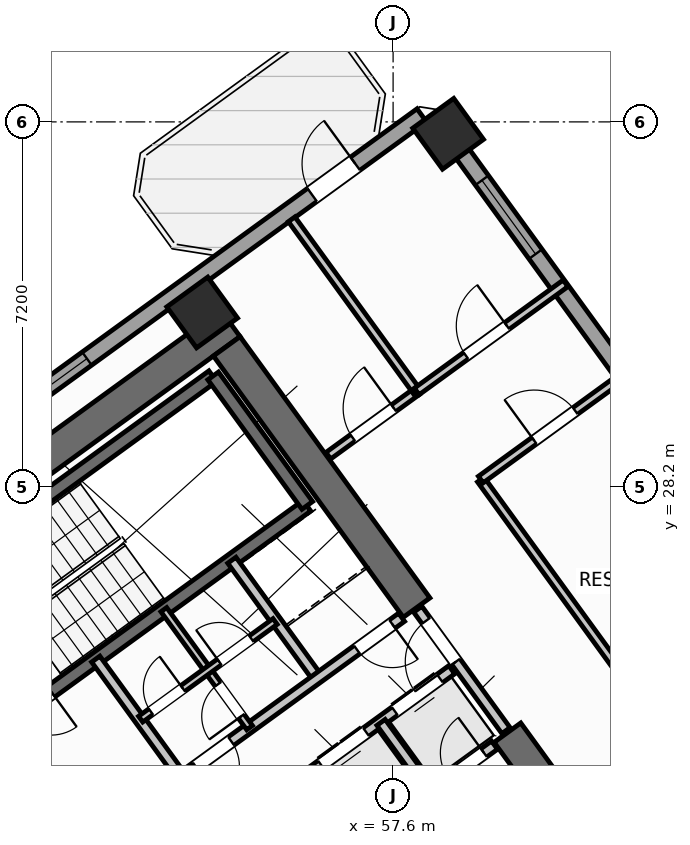
"""IFC4 building model, lengths in metres.
Left out: names, types, materials, properties, quantities, classifications, styles, units other than length and angle.
Written with IfcOpenShell. Run it as: python <this file> out.ifc"""

import sys

from ifc_helpers import new_model, si_unit, direction, frame, frame_2d, origin, origin_2d, place, context, subcontext, project, spatial, rectangle, hollow_rectangle, extrude, source, transform, mapped, element, fill, save


model = new_model("IFC4")
c1 = context("Model", 3, precision=1e-05, world=origin(), true_north=direction((0.0, 1.0)))
c2 = subcontext(c1, "Body", "Model", "MODEL_VIEW")
j1 = project(units=[si_unit("LENGTHUNIT", "METRE"), si_unit("PLANEANGLEUNIT", "RADIAN")], contexts=[c1])
p1 = place(None, origin())
s1 = spatial("IfcSite", under=j1, at=p1, CompositionType="ELEMENT")
p2 = place(p1, origin())
s2 = spatial("IfcBuilding", under=s1, at=p2, CompositionType="ELEMENT")
p3 = place(p2, frame((0.0, 0.0, 38.4)))
s3 = spatial("IfcBuildingStorey", under=s2, at=p3, CompositionType="ELEMENT", Elevation=38.4)
p4 = place(p3, frame((44.325, 24.113, 0.0), z_axis=(0.0, 0.0, 1.0), x_axis=(0.809012664862, 0.58779121131, 0.0)))
e1 = element("IfcWall", 1, at=p4, inside=s3, PredefinedType="SHEAR", context=c2, shape_type="SweptSolid", body=[
    extrude(rectangle(XDim=12.44, YDim=0.65, at=frame_2d((6.22, 0.0))), origin(), (0.0, 0.0, 1.0), 3.35),
])
p5 = place(p3, frame((61.929, 20.494, 0.0), z_axis=(0.0, 0.0, 1.0), x_axis=(-0.58782982593, 0.808984607855, 0.0)))
e2 = element("IfcWall", 2, at=p5, inside=s3, PredefinedType="SHEAR", context=c2, shape_type="SweptSolid", body=[
    extrude(rectangle(XDim=3.525, YDim=0.65, at=frame_2d((1.762, 0.0))), origin(), (0.0, 0.0, 1.0), 3.35),
])
p6 = place(p3, frame((58.064, 25.813, 0.0), z_axis=(0.0, 0.0, 1.0), x_axis=(-0.58777996584, 0.809020835181, 0.0)))
e3 = element("IfcWall", 3, at=p6, inside=s3, PredefinedType="SHEAR", context=c2, shape_type="SweptSolid", body=[
    extrude(rectangle(XDim=6.375, YDim=0.65, at=frame_2d((3.188, 0.0))), origin(), (0.0, 0.0, 1.0), 3.35),
])
m1 = source(origin(), c2, "Body", "SweptSolid", [
    extrude(hollow_rectangle(XDim=1.0, YDim=1.0, WallThickness=0.04, at=origin_2d()), origin(), (0.0, 0.0, 1.0), 3.6),
])
for number, where, z_axis, x_axis in (
    (4, (53.832, 31.638, 0.0), (0.0, 0.0, 1.0), (0.809, 0.588, 0.0)),
    (5, (58.686, 35.165, 0.0), (0.0, 0.0, 1.0), (0.809, 0.588, 0.0)),
):
    element("IfcColumn", number, at=place(p3, frame(where, z_axis=z_axis, x_axis=x_axis)), inside=s3, PredefinedType="COLUMN", context=c2, shape_type="MappedRepresentation", body=[
        mapped(m1, transform((0.0, 0.0, 0.0), scale=1.0)),
    ])
p7 = place(p3, frame((43.938, 25.192, 0.0), z_axis=(0.0, 0.0, 1.0), x_axis=(0.809016324578, 0.587786174187, 0.0)))
e6 = element("IfcWall", 6, at=p7, inside=s3, PredefinedType="STANDARD", context=c2, shape_type="SweptSolid", body=[
    extrude(rectangle(XDim=17.587, YDim=0.32, at=frame_2d((8.794, 0.0))), origin(), (0.0, 0.0, 1.0), 3.35),
])
p8 = place(p7, frame((14.914, 0.0, 0.0)))
e7 = element("IfcOpeningElement", 7, at=p8, cuts=e6, PredefinedType="OPENING", context=c2, shape_type="SweptSolid", body=[
    extrude(rectangle(XDim=1.05, YDim=2.15, at=frame_2d((0.525, 1.075))), frame((0.0, 0.17, 0.0), z_axis=(0.0, -1.0, 0.0), x_axis=(1.0, 0.0, 0.0)), (0.0, 0.0, 1.0), 0.34),
])
p9 = place(p7, frame((2.169, 0.0, 0.8)))
e8 = element("IfcOpeningElement", 8, at=p9, cuts=e6, PredefinedType="OPENING", context=c2, shape_type="SweptSolid", body=[
    extrude(rectangle(XDim=2.1, YDim=1.55, at=frame_2d((1.05, 0.775))), frame((0.0, 0.17, 0.0), z_axis=(0.0, -1.0, 0.0), x_axis=(1.0, 0.0, 0.0)), (0.0, 0.0, 1.0), 0.34),
])
p10 = place(p7, frame((7.319, 0.0, 0.8)))
e9 = element("IfcOpeningElement", 9, at=p10, cuts=e6, PredefinedType="OPENING", context=c2, shape_type="SweptSolid", body=[
    extrude(rectangle(XDim=2.1, YDim=1.55, at=frame_2d((1.05, 0.775))), frame((0.0, 0.17, 0.0), z_axis=(0.0, -1.0, 0.0), x_axis=(1.0, 0.0, 0.0)), (0.0, 0.0, 1.0), 0.34),
])
p11 = place(p3, frame((58.455, 35.484, 0.0), z_axis=(0.0, 0.0, 1.0), x_axis=(0.587783625747, -0.809018176127, 0.0)))
e10 = element("IfcWall", 10, at=p11, inside=s3, PredefinedType="STANDARD", context=c2, shape_type="SweptSolid", body=[
    extrude(rectangle(XDim=21.587, YDim=0.32, at=frame_2d((10.794, 0.0))), origin(), (0.0, 0.0, 1.0), 2.725),
])
p12 = place(p11, frame((1.529, 0.0, 0.85)))
e11 = element("IfcOpeningElement", 11, at=p12, cuts=e10, PredefinedType="OPENING", context=c2, shape_type="SweptSolid", body=[
    extrude(rectangle(XDim=1.8, YDim=1.5, at=frame_2d((0.9, 0.75))), frame((0.0, 0.17, 0.0), z_axis=(0.0, -1.0, 0.0), x_axis=(1.0, 0.0, 0.0)), (0.0, 0.0, 1.0), 0.34),
])
p13 = place(p11, frame((10.444, 0.0, 0.85)))
e12 = element("IfcOpeningElement", 12, at=p13, cuts=e10, PredefinedType="OPENING", context=c2, shape_type="SweptSolid", body=[
    extrude(rectangle(XDim=1.8, YDim=1.5, at=frame_2d((0.9, 0.75))), frame((0.0, 0.17, 0.0), z_axis=(0.0, -1.0, 0.0), x_axis=(1.0, 0.0, 0.0)), (0.0, 0.0, 1.0), 0.34),
])
p14 = place(p11, frame((17.595, 0.0, 0.85)))
e13 = element("IfcOpeningElement", 13, at=p14, cuts=e10, PredefinedType="OPENING", context=c2, shape_type="SweptSolid", body=[
    extrude(rectangle(XDim=1.5, YDim=1.5, at=frame_2d((0.75, 0.75))), frame((0.0, 0.17, 0.0), z_axis=(0.0, -1.0, 0.0), x_axis=(1.0, 0.0, 0.0)), (0.0, 0.0, 1.0), 0.34),
])
p15 = place(p3, frame((48.006, 25.996, 0.0), z_axis=(0.0, 0.0, 1.0), x_axis=(0.80901903764, 0.587782439969, 0.0)))
e14 = element("IfcWall", 14, at=p15, inside=s3, PredefinedType="SHEAR", context=c2, shape_type="SweptSolid", body=[
    extrude(rectangle(XDim=7.46, YDim=0.26, at=frame_2d((3.73, 0.0))), origin(), (0.0, 0.0, 1.0), 3.35),
])
p16 = place(p3, frame((49.863, 23.44, 0.0), z_axis=(0.0, 0.0, 1.0), x_axis=(0.809003474932, 0.587803859759, 0.0)))
e15 = element("IfcWall", 15, at=p16, inside=s3, PredefinedType="SHEAR", context=c2, shape_type="SweptSolid", body=[
    extrude(rectangle(XDim=7.46, YDim=0.26, at=frame_2d((3.73, 0.0))), origin(), (0.0, 0.0, 1.0), 3.35),
])
p17 = place(p16, frame((0.36, 0.0, 0.0)))
e16 = element("IfcOpeningElement", 16, at=p17, cuts=e15, PredefinedType="OPENING", context=c2, shape_type="SweptSolid", body=[
    extrude(rectangle(XDim=0.86, YDim=2.05, at=frame_2d((0.43, 1.025))), frame((0.0, 0.14, 0.0), z_axis=(0.0, -1.0, 0.0), x_axis=(1.0, 0.0, 0.0)), (0.0, 0.0, 1.0), 0.28),
])
p18 = place(p3, frame((55.906, 27.831, 0.0), z_axis=(0.0, 0.0, 1.0), x_axis=(-0.587804123638, 0.809003283204, 0.0)))
e17 = element("IfcWall", 17, at=p18, inside=s3, PredefinedType="SHEAR", context=c2, shape_type="SweptSolid", body=[
    extrude(rectangle(XDim=3.16, YDim=0.26, at=frame_2d((1.58, 0.0))), origin(), (0.0, 0.0, 1.0), 3.35),
])
p19 = place(p3, frame((56.553, 20.884, 0.0), z_axis=(0.0, 0.0, 1.0), x_axis=(0.809035789462, 0.587759382205, 0.0)))
e18 = element("IfcWall", 18, at=p19, inside=s3, PredefinedType="STANDARD", context=c2, shape_type="SweptSolid", body=[
    extrude(rectangle(XDim=3.768, YDim=0.2, at=frame_2d((1.884, 0.0))), origin(), (0.0, 0.0, 1.0), 3.34),
])
p20 = place(p19, frame((2.65, 0.0, 0.0)))
e19 = element("IfcOpeningElement", 19, at=p20, cuts=e18, PredefinedType="OPENING", context=c2, shape_type="SweptSolid", body=[
    extrude(rectangle(XDim=0.86, YDim=2.05, at=frame_2d((0.43, 1.025))), frame((0.0, 0.11, 0.0), z_axis=(0.0, -1.0, 0.0), x_axis=(1.0, 0.0, 0.0)), (0.0, 0.0, 1.0), 0.22),
])
p21 = place(p3, frame((54.421, 21.436, 0.0), z_axis=(0.0, 0.0, 1.0), x_axis=(0.809013710463, 0.587789772183, 0.0)))
e20 = element("IfcWall", 20, at=p21, inside=s3, PredefinedType="STANDARD", context=c2, shape_type="SweptSolid", body=[
    extrude(rectangle(XDim=5.36, YDim=0.2, at=frame_2d((2.68, 0.0))), origin(), (0.0, 0.0, 1.0), 3.34),
])
p22 = place(p21, frame((0.37, 0.0, 0.0)))
e21 = element("IfcOpeningElement", 21, at=p22, cuts=e20, PredefinedType="OPENING", context=c2, shape_type="SweptSolid", body=[
    extrude(rectangle(XDim=1.1, YDim=2.15, at=frame_2d((0.55, 1.075))), frame((0.0, 0.11, 0.0), z_axis=(0.0, -1.0, 0.0), x_axis=(1.0, 0.0, 0.0)), (0.0, 0.0, 1.0), 0.22),
])
p23 = place(p21, frame((2.17, 0.0, 0.0)))
e22 = element("IfcOpeningElement", 22, at=p23, cuts=e20, PredefinedType="OPENING", context=c2, shape_type="SweptSolid", body=[
    extrude(rectangle(XDim=1.1, YDim=2.15, at=frame_2d((0.55, 1.075))), frame((0.0, 0.11, 0.0), z_axis=(0.0, -1.0, 0.0), x_axis=(1.0, 0.0, 0.0)), (0.0, 0.0, 1.0), 0.22),
])
p24 = place(p21, frame((3.97, 0.0, 0.0)))
e23 = element("IfcOpeningElement", 23, at=p24, cuts=e20, PredefinedType="OPENING", context=c2, shape_type="SweptSolid", body=[
    extrude(rectangle(XDim=1.1, YDim=2.15, at=frame_2d((0.55, 1.075))), frame((0.0, 0.11, 0.0), z_axis=(0.0, -1.0, 0.0), x_axis=(1.0, 0.0, 0.0)), (0.0, 0.0, 1.0), 0.22),
])
p25 = place(p3, frame((58.29, 22.27, 0.0), z_axis=(0.0, 0.0, 1.0), x_axis=(-0.587840865826, 0.808976585857, 0.0)))
e24 = element("IfcWall", 24, at=p25, inside=s3, PredefinedType="STANDARD", context=c2, shape_type="SweptSolid", body=[
    extrude(rectangle(XDim=1.58, YDim=0.2, at=frame_2d((0.79, 0.0))), origin(), (0.0, 0.0, 1.0), 3.34),
])
p26 = place(p3, frame((53.425, 22.468, 0.0), z_axis=(0.0, 0.0, 1.0), x_axis=(-0.5877230039, 0.809062216821, 0.0)))
e25 = element("IfcWall", 25, at=p26, inside=s3, PredefinedType="STANDARD", context=c2, shape_type="SweptSolid", body=[
    extrude(rectangle(XDim=2.88, YDim=0.2, at=frame_2d((1.44, 0.0))), origin(), (0.0, 0.0, 1.0), 3.34),
])
p27 = place(p3, frame((56.111, 24.419, 0.0), z_axis=(0.0, 0.0, 1.0), x_axis=(-0.58777848983, 0.809021907548, 0.0)))
e26 = element("IfcWall", 26, at=p27, inside=s3, PredefinedType="STANDARD", context=c2, shape_type="SweptSolid", body=[
    extrude(rectangle(XDim=2.88, YDim=0.2, at=frame_2d((1.44, 0.0))), origin(), (0.0, 0.0, 1.0), 3.34),
])
p28 = place(p3, frame((53.425, 22.468, 0.0), z_axis=(0.0, 0.0, 1.0), x_axis=(0.80902705128, 0.587771409902, 0.0)))
e27 = element("IfcWall", 27, at=p28, inside=s3, PredefinedType="STANDARD", context=c2, shape_type="SweptSolid", body=[
    extrude(rectangle(XDim=5.368, YDim=0.2, at=frame_2d((2.684, 0.0))), origin(), (0.0, 0.0, 1.0), 3.34),
])
p29 = place(p28, frame((4.28, 0.0, 0.0)))
e28 = element("IfcOpeningElement", 28, at=p29, cuts=e27, PredefinedType="OPENING", context=c2, shape_type="SweptSolid", body=[
    extrude(rectangle(XDim=0.86, YDim=2.05, at=frame_2d((0.43, 1.025))), frame((0.0, 0.11, 0.0), z_axis=(0.0, -1.0, 0.0), x_axis=(1.0, 0.0, 0.0)), (0.0, 0.0, 1.0), 0.22),
])
p30 = place(p28, frame((0.35, 0.0, 0.0)))
e29 = element("IfcOpeningElement", 29, at=p30, cuts=e27, PredefinedType="OPENING", context=c2, shape_type="SweptSolid", body=[
    extrude(rectangle(XDim=0.86, YDim=2.05, at=frame_2d((0.43, 1.025))), frame((0.0, 0.11, 0.0), z_axis=(0.0, -1.0, 0.0), x_axis=(1.0, 0.0, 0.0)), (0.0, 0.0, 1.0), 0.22),
])
p31 = place(p3, frame((54.768, 23.443, 0.0), z_axis=(0.0, 0.0, 1.0), x_axis=(-0.587736077749, 0.809052719489, 0.0)))
e30 = element("IfcWall", 30, at=p31, inside=s3, PredefinedType="PLUMBINGWALL", context=c2, shape_type="SweptSolid", body=[
    extrude(rectangle(XDim=1.4, YDim=0.14, at=frame_2d((0.7, 0.0))), origin(), (0.0, 0.0, 1.0), 3.34),
])
p32 = place(p31, frame((0.28, 0.0, 0.0)))
e31 = element("IfcOpeningElement", 31, at=p32, cuts=e30, PredefinedType="OPENING", context=c2, shape_type="SweptSolid", body=[
    extrude(rectangle(XDim=0.78, YDim=2.05, at=frame_2d((0.39, 1.025))), frame((0.0, 0.08, 0.0), z_axis=(0.0, -1.0, 0.0), x_axis=(1.0, 0.0, 0.0)), (0.0, 0.0, 1.0), 0.16),
])
p33 = place(p3, frame((53.945, 24.576, 0.0), z_axis=(0.0, 0.0, 1.0), x_axis=(-0.587897037186, 0.808935766095, 0.0)))
e32 = element("IfcWall", 32, at=p33, inside=s3, PredefinedType="PLUMBINGWALL", context=c2, shape_type="SweptSolid", body=[
    extrude(rectangle(XDim=1.48, YDim=0.14, at=frame_2d((0.74, 0.0))), origin(), (0.0, 0.0, 1.0), 3.34),
])
p34 = place(p3, frame((52.618, 23.612, 0.0), z_axis=(0.0, 0.0, 1.0), x_axis=(0.809009587469, 0.587795446889, 0.0)))
e33 = element("IfcWall", 33, at=p34, inside=s3, PredefinedType="PLUMBINGWALL", context=c2, shape_type="SweptSolid", body=[
    extrude(rectangle(XDim=3.28, YDim=0.14, at=frame_2d((1.64, 0.0))), origin(), (0.0, 0.0, 1.0), 3.34),
])
p35 = place(p34, frame((0.25, 0.0, 0.0)))
e34 = element("IfcOpeningElement", 34, at=p35, cuts=e33, PredefinedType="OPENING", context=c2, shape_type="SweptSolid", body=[
    extrude(rectangle(XDim=0.78, YDim=2.05, at=frame_2d((0.39, 1.025))), frame((0.0, 0.08, 0.0), z_axis=(0.0, -1.0, 0.0), x_axis=(1.0, 0.0, 0.0)), (0.0, 0.0, 1.0), 0.16),
])
p36 = place(p34, frame((1.92, 0.0, 0.0)))
e35 = element("IfcOpeningElement", 35, at=p36, cuts=e33, PredefinedType="OPENING", context=c2, shape_type="SweptSolid", body=[
    extrude(rectangle(XDim=0.78, YDim=2.05, at=frame_2d((0.39, 1.025))), frame((0.0, 0.08, 0.0), z_axis=(0.0, -1.0, 0.0), x_axis=(1.0, 0.0, 0.0)), (0.0, 0.0, 1.0), 0.16),
])
p37 = place(p3, frame((59.827, 23.386, 0.0), z_axis=(0.0, 0.0, 1.0), x_axis=(-0.587803840107, 0.809003489211, 0.0)))
e36 = element("IfcWall", 36, at=p37, inside=s3, PredefinedType="STANDARD", context=c2, shape_type="SweptSolid", body=[
    extrude(rectangle(XDim=2.96, YDim=0.2, at=frame_2d((1.48, 0.0))), origin(), (0.0, 0.0, 1.0), 3.34),
])
p38 = place(p37, frame((1.68, 0.0, 0.0)))
e37 = element("IfcOpeningElement", 37, at=p38, cuts=e36, PredefinedType="OPENING", context=c2, shape_type="SweptSolid", body=[
    extrude(rectangle(XDim=1.0, YDim=2.1, at=frame_2d((0.5, 1.05))), frame((0.0, 0.11, 0.0), z_axis=(0.0, -1.0, 0.0), x_axis=(1.0, 0.0, 0.0)), (0.0, 0.0, 1.0), 0.22),
])
p39 = place(p3, frame((56.321, 28.812, 0.0), z_axis=(0.0, 0.0, 1.0), x_axis=(0.809029482429, 0.587768063577, 0.0)))
e38 = element("IfcWall", 38, at=p39, inside=s3, PredefinedType="PARTITIONING", context=c2, shape_type="SweptSolid", body=[
    extrude(rectangle(XDim=2.158, YDim=0.16, at=frame_2d((1.079, 0.0))), origin(), (0.0, 0.0, 1.0), 3.34),
])
p40 = place(p39, frame((0.598, 0.0, 0.0)))
e39 = element("IfcOpeningElement", 39, at=p40, cuts=e38, PredefinedType="OPENING", context=c2, shape_type="SweptSolid", body=[
    extrude(rectangle(XDim=1.0, YDim=2.1, at=frame_2d((0.5, 1.05))), frame((0.0, 0.09, 0.0), z_axis=(0.0, -1.0, 0.0), x_axis=(1.0, 0.0, 0.0)), (0.0, 0.0, 1.0), 0.18),
])
p41 = place(p3, frame((68.353, 15.922, 0.0), z_axis=(0.0, 0.0, 1.0), x_axis=(-0.587782002009, 0.809019355834, 0.0)))
e40 = element("IfcWall", 40, at=p41, inside=s3, PredefinedType="PARTITIONING", context=c2, shape_type="SweptSolid", body=[
    extrude(rectangle(XDim=15.35, YDim=0.16, at=frame_2d((7.675, 0.0))), origin(), (0.0, 0.0, 1.0), 3.34),
])
p42 = place(p3, frame((58.067, 30.08, 0.0), z_axis=(0.0, 0.0, 1.0), x_axis=(-0.587812175236, 0.808997433027, 0.0)))
e41 = element("IfcWall", 41, at=p42, inside=s3, PredefinedType="PARTITIONING", context=c2, shape_type="SweptSolid", body=[
    extrude(rectangle(XDim=4.2, YDim=0.16, at=frame_2d((2.1, 0.0))), origin(), (0.0, 0.0, 1.0), 3.34),
])
p43 = place(p3, frame((59.331, 28.341, 0.0), z_axis=(0.0, 0.0, 1.0), x_axis=(0.809003564202, 0.587803736896, 0.0)))
e42 = element("IfcWall", 42, at=p43, inside=s3, PredefinedType="PARTITIONING", context=c2, shape_type="SweptSolid", body=[
    extrude(rectangle(XDim=3.63, YDim=0.16, at=frame_2d((1.815, 0.0))), origin(), (0.0, 0.0, 1.0), 3.34),
])
p44 = place(p43, frame((1.305, 0.0, 0.0)))
e43 = element("IfcOpeningElement", 43, at=p44, cuts=e42, PredefinedType="OPENING", context=c2, shape_type="SweptSolid", body=[
    extrude(rectangle(XDim=1.0, YDim=2.1, at=frame_2d((0.5, 1.05))), frame((0.0, 0.09, 0.0), z_axis=(0.0, -1.0, 0.0), x_axis=(1.0, 0.0, 0.0)), (0.0, 0.0, 1.0), 0.18),
])
p45 = place(p3, frame((58.067, 30.08, 0.0), z_axis=(0.0, 0.0, 1.0), x_axis=(0.809012309495, 0.587791700422, 0.0)))
e44 = element("IfcWall", 44, at=p45, inside=s3, PredefinedType="PARTITIONING", context=c2, shape_type="SweptSolid", body=[
    extrude(rectangle(XDim=3.63, YDim=0.16, at=frame_2d((1.815, 0.0))), origin(), (0.0, 0.0, 1.0), 3.34),
])
p46 = place(p45, frame((1.2, 0.0, 0.0)))
e45 = element("IfcOpeningElement", 45, at=p46, cuts=e44, PredefinedType="OPENING", context=c2, shape_type="SweptSolid", body=[
    extrude(rectangle(XDim=1.0, YDim=2.1, at=frame_2d((0.5, 1.05))), frame((0.0, 0.09, 0.0), z_axis=(0.0, -1.0, 0.0), x_axis=(1.0, 0.0, 0.0)), (0.0, 0.0, 1.0), 0.18),
])
m2 = source(origin(), c2, "Body", "SweptSolid", [
    extrude(rectangle(XDim=1.05, YDim=2.15, at=frame_2d((0.525, 1.075))), frame((0.0, 0.025, 0.0), z_axis=(0.0, -1.0, 0.0), x_axis=(1.0, 0.0, 0.0)), (0.0, 0.0, 1.0), 0.05),
])
p47 = place(p8, origin())
e46 = element("IfcDoor", 46, at=p47, inside=s3, OperationType="SINGLE_SWING_RIGHT", PredefinedType="DOOR", context=c2, shape_type="MappedRepresentation", body=[
    mapped(m2, transform((0.0, 0.0, 0.0), scale=1.0)),
])
fill(e7, e46)
m3 = source(origin(), c2, "Body", "SweptSolid", [
    extrude(rectangle(XDim=2.1, YDim=1.55, at=frame_2d((1.05, 0.775))), frame((0.0, 0.03, 0.0), z_axis=(0.0, -1.0, 0.0), x_axis=(1.0, 0.0, 0.0)), (0.0, 0.0, 1.0), 0.06),
])
p48 = place(p10, origin())
e47 = element("IfcWindow", 47, at=p48, inside=s3, PartitioningType="SINGLE_PANEL", PredefinedType="WINDOW", context=c2, shape_type="MappedRepresentation", body=[
    mapped(m3, transform((0.0, 0.0, 0.0), scale=1.0)),
])
fill(e9, e47)
m4 = source(origin(), c2, "Body", "SweptSolid", [
    extrude(rectangle(XDim=1.8, YDim=1.5, at=frame_2d((0.9, 0.75))), frame((0.0, 0.03, 0.0), z_axis=(0.0, -1.0, 0.0), x_axis=(1.0, 0.0, 0.0)), (0.0, 0.0, 1.0), 0.06),
])
p49 = place(p12, origin())
e48 = element("IfcWindow", 48, at=p49, inside=s3, PartitioningType="SINGLE_PANEL", PredefinedType="WINDOW", context=c2, shape_type="MappedRepresentation", body=[
    mapped(m4, transform((0.0, 0.0, 0.0), scale=1.0)),
])
fill(e11, e48)
m5 = source(origin(), c2, "Body", "SweptSolid", [
    extrude(rectangle(XDim=1.1, YDim=2.15, at=frame_2d((0.55, 1.075))), frame((0.0, 0.025, 0.0), z_axis=(0.0, -1.0, 0.0), x_axis=(1.0, 0.0, 0.0)), (0.0, 0.0, 1.0), 0.05),
])
p50 = place(p23, origin())
e49 = element("IfcDoor", 49, at=p50, inside=s3, OperationType="DOUBLE_DOOR_SLIDING", PredefinedType="DOOR", context=c2, shape_type="MappedRepresentation", body=[
    mapped(m5, transform((0.0, 0.0, 0.0), scale=1.0)),
])
fill(e22, e49)
p51 = place(p24, origin())
e50 = element("IfcDoor", 50, at=p51, inside=s3, OperationType="DOUBLE_DOOR_SLIDING", PredefinedType="DOOR", context=c2, shape_type="MappedRepresentation", body=[
    mapped(m5, transform((0.0, 0.0, 0.0), scale=1.0)),
])
fill(e23, e50)
m6 = source(origin(), c2, "Body", "SweptSolid", [
    extrude(rectangle(XDim=0.86, YDim=2.05, at=frame_2d((0.43, 1.025))), frame((0.0, 0.025, 0.0), z_axis=(0.0, -1.0, 0.0), x_axis=(1.0, 0.0, 0.0)), (0.0, 0.0, 1.0), 0.05),
])
p52 = place(p20, origin())
e51 = element("IfcDoor", 51, at=p52, inside=s3, OperationType="SINGLE_SWING_RIGHT", PredefinedType="DOOR", context=c2, shape_type="MappedRepresentation", body=[
    mapped(m6, transform((0.0, 0.0, 0.0), scale=1.0)),
])
fill(e19, e51)
p53 = place(p29, frame((0.86, 0.0, 0.0), z_axis=(0.0, 0.0, 1.0), x_axis=(-1.0, 0.0, 0.0)))
e52 = element("IfcDoor", 52, at=p53, inside=s3, OperationType="SINGLE_SWING_LEFT", PredefinedType="DOOR", context=c2, shape_type="MappedRepresentation", body=[
    mapped(m6, transform((0.0, 0.0, 0.0), scale=1.0)),
])
fill(e28, e52)
p54 = place(p30, frame((0.86, 0.0, 0.0), z_axis=(0.0, 0.0, 1.0), x_axis=(-1.0, 0.0, 0.0)))
e53 = element("IfcDoor", 53, at=p54, inside=s3, OperationType="SINGLE_SWING_RIGHT", PredefinedType="DOOR", context=c2, shape_type="MappedRepresentation", body=[
    mapped(m6, transform((0.0, 0.0, 0.0), scale=1.0)),
])
fill(e29, e53)
m7 = source(origin(), c2, "Body", "SweptSolid", [
    extrude(rectangle(XDim=0.78, YDim=2.05, at=frame_2d((0.39, 1.025))), frame((0.0, 0.025, 0.0), z_axis=(0.0, -1.0, 0.0), x_axis=(1.0, 0.0, 0.0)), (0.0, 0.0, 1.0), 0.05),
])
p55 = place(p32, origin())
e54 = element("IfcDoor", 54, at=p55, inside=s3, OperationType="SINGLE_SWING_LEFT", PredefinedType="DOOR", context=c2, shape_type="MappedRepresentation", body=[
    mapped(m7, transform((0.0, 0.0, 0.0), scale=1.0)),
])
fill(e31, e54)
p56 = place(p35, origin())
e55 = element("IfcDoor", 55, at=p56, inside=s3, OperationType="SINGLE_SWING_RIGHT", PredefinedType="DOOR", context=c2, shape_type="MappedRepresentation", body=[
    mapped(m7, transform((0.0, 0.0, 0.0), scale=1.0)),
])
fill(e34, e55)
p57 = place(p36, origin())
e56 = element("IfcDoor", 56, at=p57, inside=s3, OperationType="SINGLE_SWING_LEFT", PredefinedType="DOOR", context=c2, shape_type="MappedRepresentation", body=[
    mapped(m7, transform((0.0, 0.0, 0.0), scale=1.0)),
])
fill(e35, e56)
m8 = source(origin(), c2, "Body", "SweptSolid", [
    extrude(rectangle(XDim=1.0, YDim=2.1, at=frame_2d((0.5, 1.05))), frame((0.0, 0.025, 0.0), z_axis=(0.0, -1.0, 0.0), x_axis=(1.0, 0.0, 0.0)), (0.0, 0.0, 1.0), 0.05),
])
p58 = place(p40, origin())
e57 = element("IfcDoor", 57, at=p58, inside=s3, OperationType="SINGLE_SWING_RIGHT", PredefinedType="DOOR", context=c2, shape_type="MappedRepresentation", body=[
    mapped(m8, transform((0.0, 0.0, 0.0), scale=1.0)),
])
fill(e39, e57)
p59 = place(p38, origin())
e58 = element("IfcDoor", 58, at=p59, inside=s3, OperationType="SINGLE_SWING_LEFT", PredefinedType="DOOR", context=c2, shape_type="MappedRepresentation", body=[
    mapped(m8, transform((0.0, 0.0, 0.0), scale=1.0)),
])
fill(e37, e58)
p60 = place(p46, origin())
e59 = element("IfcDoor", 59, at=p60, inside=s3, OperationType="SINGLE_SWING_RIGHT", PredefinedType="DOOR", context=c2, shape_type="MappedRepresentation", body=[
    mapped(m8, transform((0.0, 0.0, 0.0), scale=1.0)),
])
fill(e45, e59)
p61 = place(p44, origin())
e60 = element("IfcDoor", 60, at=p61, inside=s3, OperationType="SINGLE_SWING_LEFT", PredefinedType="DOOR", context=c2, shape_type="MappedRepresentation", body=[
    mapped(m8, transform((0.0, 0.0, 0.0), scale=1.0)),
])
fill(e43, e60)
save(model, sys.argv[1])
